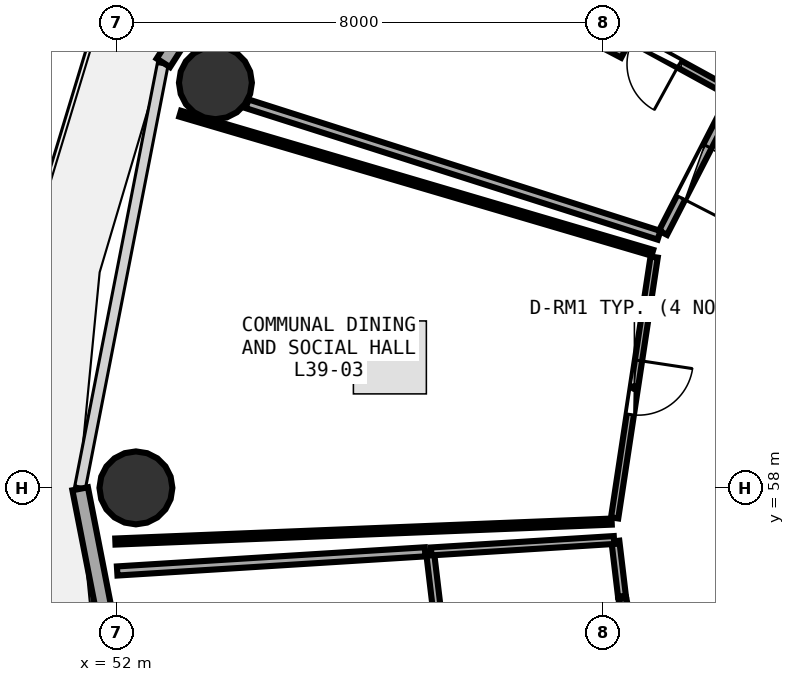
"""IFC4 building model, lengths in metres.
Left out: names, types, materials, properties, quantities, classifications, styles, units other than length and angle.
Written with IfcOpenShell. Run it as: python <this file> out.ifc"""

import sys

from ifc_helpers import new_model, si_unit, direction, frame, frame_2d, origin, origin_2d, place, context, subcontext, project, spatial, rectangle, circle, extrude, element, fill, save


model = new_model("IFC4")
c1 = context("Model", 3, precision=1e-05, world=origin(), true_north=direction((0.0, 1.0)))
c2 = subcontext(c1, "Body", "Model", "MODEL_VIEW")
j1 = project(units=[si_unit("LENGTHUNIT", "METRE"), si_unit("PLANEANGLEUNIT", "RADIAN")], contexts=[c1])
p1 = place(None, origin())
s1 = spatial("IfcSite", under=j1, at=p1, CompositionType="ELEMENT")
p2 = place(p1, origin())
s2 = spatial("IfcBuilding", under=s1, at=p2, CompositionType="ELEMENT")
p3 = place(p2, frame((0.0, 0.0, 154.35)))
s3 = spatial("IfcBuildingStorey", under=s2, at=p3, CompositionType="ELEMENT", Elevation=154.35)
for number, where, z_axis, x_axis in (
    (1, (53.627, 64.663, 0.0), (0.0, 0.0, 1.0), (1.0, 0.0, 0.0)),
    (2, (52.32, 58.0, 0.0), (0.0, 0.0, 1.0), (1.0, 0.0, 0.0)),
):
    element("IfcColumn", number, at=place(p3, frame(where, z_axis=z_axis, x_axis=x_axis)), inside=s3, PredefinedType="COLUMN", context=c2, shape_type="SweptSolid", body=[
        extrude(circle(Radius=0.6, at=origin_2d()), origin(), (0.0, 0.0, 1.0), 3.75),
    ])
p4 = place(p3, frame((56.679, 71.1, 0.0), z_axis=(0.0, 0.0, 1.0), x_axis=(-0.538801521808, -0.842432739213, 0.0)))
e3 = element("IfcWall", 3, at=p4, inside=s3, PredefinedType="SOLIDWALL", context=c2, shape_type="SweptSolid", body=[
    extrude(rectangle(XDim=7.253, YDim=0.26, at=frame_2d((3.627, 0.0))), origin(), (0.0, 0.0, 1.0), 3.475),
])
p5 = place(p4, frame((3.152, 0.0, 0.0)))
e4 = element("IfcOpeningElement", 4, at=p5, cuts=e3, PredefinedType="OPENING", context=c2, shape_type="SweptSolid", body=[
    extrude(rectangle(XDim=0.95, YDim=2.1, at=frame_2d((0.475, 1.05))), frame((0.0, 0.14, 0.0), z_axis=(0.0, -1.0, 0.0), x_axis=(1.0, 0.0, 0.0)), (0.0, 0.0, 1.0), 0.28),
])
p6 = place(p4, frame((4.452, 0.0, 0.85)))
e5 = element("IfcOpeningElement", 5, at=p6, cuts=e3, PredefinedType="OPENING", context=c2, shape_type="SweptSolid", body=[
    extrude(rectangle(XDim=1.2, YDim=1.45, at=frame_2d((0.6, 0.725))), frame((0.0, 0.14, 0.0), z_axis=(0.0, -1.0, 0.0), x_axis=(1.0, 0.0, 0.0)), (0.0, 0.0, 1.0), 0.28),
])
p7 = place(p3, frame((51.403, 57.985, 0.0), z_axis=(0.0, 0.0, 1.0), x_axis=(0.191716984769, -0.981450252306, 0.0)))
e6 = element("IfcWall", 6, at=p7, inside=s3, PredefinedType="SOLIDWALL", context=c2, shape_type="SweptSolid", body=[
    extrude(rectangle(XDim=7.079, YDim=0.26, at=frame_2d((3.54, 0.0))), origin(), (0.0, 0.0, 1.0), 3.475),
])
p8 = place(p7, frame((2.74, 0.0, 0.85)))
e7 = element("IfcOpeningElement", 7, at=p8, cuts=e6, PredefinedType="OPENING", context=c2, shape_type="SweptSolid", body=[
    extrude(rectangle(XDim=1.6, YDim=1.45, at=frame_2d((0.8, 0.725))), frame((0.0, 0.14, 0.0), z_axis=(0.0, -1.0, 0.0), x_axis=(1.0, 0.0, 0.0)), (0.0, 0.0, 1.0), 0.28),
])
p9 = place(p3, frame((62.131, 64.489, 0.0), z_axis=(0.0, 0.0, 1.0), x_axis=(-0.87680194327, 0.480851694681, 0.0)))
e8 = element("IfcWall", 8, at=p9, inside=s3, PredefinedType="PLUMBINGWALL", context=c2, shape_type="SweptSolid", body=[
    extrude(rectangle(XDim=2.855, YDim=0.13, at=frame_2d((1.428, 0.0))), origin(), (0.0, 0.0, 1.0), 2.975),
])
p10 = place(p9, frame((0.998, 0.0, 0.0)))
e9 = element("IfcOpeningElement", 9, at=p10, cuts=e8, PredefinedType="OPENING", context=c2, shape_type="SweptSolid", body=[
    extrude(rectangle(XDim=0.86, YDim=2.05, at=frame_2d((0.43, 1.025))), frame((0.0, 0.075, 0.0), z_axis=(0.0, -1.0, 0.0), x_axis=(1.0, 0.0, 0.0)), (0.0, 0.0, 1.0), 0.15),
])
p11 = place(p3, frame((62.015, 64.192, 0.0), z_axis=(0.0, 0.0, 1.0), x_axis=(-0.457234963971, -0.889345932538, 0.0)))
e10 = element("IfcWall", 10, at=p11, inside=s3, PredefinedType="PARTITIONING", context=c2, shape_type="SweptSolid", body=[
    extrude(rectangle(XDim=2.245, YDim=0.15, at=frame_2d((1.122, 0.0))), origin(), (0.0, 0.0, 1.0), 3.235),
])
p12 = place(p11, frame((0.647, 0.0, 0.0)))
e11 = element("IfcOpeningElement", 11, at=p12, cuts=e10, PredefinedType="OPENING", context=c2, shape_type="SweptSolid", body=[
    extrude(rectangle(XDim=0.95, YDim=2.08, at=frame_2d((0.475, 1.04))), frame((0.0, 0.085, 0.0), z_axis=(0.0, -1.0, 0.0), x_axis=(1.0, 0.0, 0.0)), (0.0, 0.0, 1.0), 0.17),
])
p13 = place(p3, frame((60.843, 61.796, 0.0), z_axis=(0.0, 0.0, 1.0), x_axis=(-0.149807046494, -0.988715251638, 0.0)))
e12 = element("IfcWall", 12, at=p13, inside=s3, PredefinedType="PARTITIONING", context=c2, shape_type="SweptSolid", body=[
    extrude(rectangle(XDim=4.338, YDim=0.12, at=frame_2d((2.169, 0.0))), origin(), (0.0, 0.0, 1.0), 2.975),
])
p14 = place(p13, frame((1.719, 0.0, 0.0)))
e13 = element("IfcOpeningElement", 13, at=p14, cuts=e12, PredefinedType="OPENING", context=c2, shape_type="SweptSolid", body=[
    extrude(rectangle(XDim=0.9, YDim=2.08, at=frame_2d((0.45, 1.04))), frame((0.0, 0.07, 0.0), z_axis=(0.0, -1.0, 0.0), x_axis=(1.0, 0.0, 0.0)), (0.0, 0.0, 1.0), 0.14),
])
p15 = place(p3, frame((60.923, 62.154, 0.0), z_axis=(0.0, 0.0, 1.0), x_axis=(-0.952653075659, 0.304059397878, 0.0)))
e14 = element("IfcWall", 14, at=p15, inside=s3, PredefinedType="PARTITIONING", context=c2, shape_type="SweptSolid", body=[
    extrude(rectangle(XDim=7.112, YDim=0.15, at=frame_2d((3.556, 0.0))), origin(), (0.0, 0.0, 1.0), 3.175),
])
p16 = place(p3, frame((59.402, 65.63, 0.0), z_axis=(0.0, 0.0, 1.0), x_axis=(0.885450338388, -0.46473400806, 0.0)))
e15 = element("IfcWall", 15, at=p16, inside=s3, PredefinedType="PARTITIONING", context=c2, shape_type="SweptSolid", body=[
    extrude(rectangle(XDim=1.054, YDim=0.15, at=frame_2d((0.527, 0.0))), origin(), (0.0, 0.0, 1.0), 3.48),
])
p17 = place(p3, frame((60.144, 57.445, 0.0), z_axis=(0.0, 0.0, 1.0), x_axis=(-0.99919531507, -0.040108881097, 0.0)))
e16 = element("IfcWall", 16, at=p17, inside=s3, PredefinedType="PARTITIONING", context=c2, shape_type="SweptSolid", body=[
    extrude(rectangle(XDim=8.169, YDim=0.1, at=frame_2d((4.084, 0.0))), origin(), (0.0, 0.0, 1.0), 3.025),
])
p18 = place(p3, frame((53.047, 64.154, 0.0), z_axis=(0.0, 0.0, 1.0), x_axis=(0.959252584651, -0.282549958133, 0.0)))
e17 = element("IfcWall", 17, at=p18, inside=s3, PredefinedType="PARTITIONING", context=c2, shape_type="SweptSolid", body=[
    extrude(rectangle(XDim=8.096, YDim=0.1, at=frame_2d((4.048, 0.0))), origin(), (0.0, 0.0, 1.0), 3.025),
])
p19 = place(p3, frame((60.205, 57.124, 0.0), z_axis=(0.0, 0.0, 1.0), x_axis=(0.118797046487, -0.992918557459, 0.0)))
e18 = element("IfcWall", 18, at=p19, inside=s3, PredefinedType="PLUMBINGWALL", context=c2, shape_type="SweptSolid", body=[
    extrude(rectangle(XDim=0.912, YDim=0.13, at=frame_2d((0.456, 0.0))), origin(), (0.0, 0.0, 1.0), 3.48),
])
p20 = place(p3, frame((60.32, 56.178, 0.0), z_axis=(0.0, 0.0, 1.0), x_axis=(0.202067144879, -0.979371670491, 0.0)))
e19 = element("IfcWall", 19, at=p20, inside=s3, PredefinedType="PLUMBINGWALL", context=c2, shape_type="SweptSolid", body=[
    extrude(rectangle(XDim=0.915, YDim=0.13, at=frame_2d((0.457, 0.0))), origin(), (0.0, 0.0, 1.0), 3.48),
])
p21 = place(p3, frame((57.292, 55.819, 0.0), z_axis=(0.0, 0.0, 1.0), x_axis=(-0.11846804652, 0.992957865145, 0.0)))
e20 = element("IfcWall", 20, at=p21, inside=s3, PredefinedType="PLUMBINGWALL", context=c2, shape_type="SweptSolid", body=[
    extrude(rectangle(XDim=1.123, YDim=0.13, at=frame_2d((0.562, 0.0))), origin(), (0.0, 0.0, 1.0), 3.48),
])
p22 = place(p3, frame((57.176, 56.955, 0.0), z_axis=(0.0, 0.0, 1.0), x_axis=(0.998056675164, 0.062312704652, 0.0)))
e21 = element("IfcWall", 21, at=p22, inside=s3, PredefinedType="PLUMBINGWALL", context=c2, shape_type="SweptSolid", body=[
    extrude(rectangle(XDim=3.013, YDim=0.13, at=frame_2d((1.506, 0.0))), origin(), (0.0, 0.0, 1.0), 3.175),
])
p23 = place(p3, frame((52.012, 56.634, 0.0), z_axis=(0.0, 0.0, 1.0), x_axis=(0.998071814667, 0.062069741162, 0.0)))
e22 = element("IfcWall", 22, at=p23, inside=s3, PredefinedType="PARTITIONING", context=c2, shape_type="SweptSolid", body=[
    extrude(rectangle(XDim=5.074, YDim=0.15, at=frame_2d((2.537, 0.0))), origin(), (0.0, 0.0, 1.0), 3.025),
])
p24 = place(p10, origin())
e23 = element("IfcDoor", 23, at=p24, inside=s3, OperationType="SINGLE_SWING_LEFT", PredefinedType="DOOR", context=c2, shape_type="SweptSolid", body=[
    extrude(rectangle(XDim=0.86, YDim=2.05, at=frame_2d((0.43, 1.025))), frame((0.0, 0.025, 0.0), z_axis=(0.0, -1.0, 0.0), x_axis=(1.0, 0.0, 0.0)), (0.0, 0.0, 1.0), 0.05),
])
fill(e9, e23)
p25 = place(p12, origin())
e24 = element("IfcDoor", 24, at=p25, inside=s3, OperationType="SINGLE_SWING_RIGHT", PredefinedType="DOOR", context=c2, shape_type="SweptSolid", body=[
    extrude(rectangle(XDim=0.95, YDim=2.08, at=frame_2d((0.475, 1.04))), frame((0.0, 0.025, 0.0), z_axis=(0.0, -1.0, 0.0), x_axis=(1.0, 0.0, 0.0)), (0.0, 0.0, 1.0), 0.05),
])
fill(e11, e24)
p26 = place(p14, origin())
e25 = element("IfcDoor", 25, at=p26, inside=s3, OperationType="SINGLE_SWING_LEFT", PredefinedType="DOOR", context=c2, shape_type="SweptSolid", body=[
    extrude(rectangle(XDim=0.9, YDim=2.08, at=frame_2d((0.45, 1.04))), frame((0.0, 0.025, 0.0), z_axis=(0.0, -1.0, 0.0), x_axis=(1.0, 0.0, 0.0)), (0.0, 0.0, 1.0), 0.05),
])
fill(e13, e25)
save(model, sys.argv[1])
